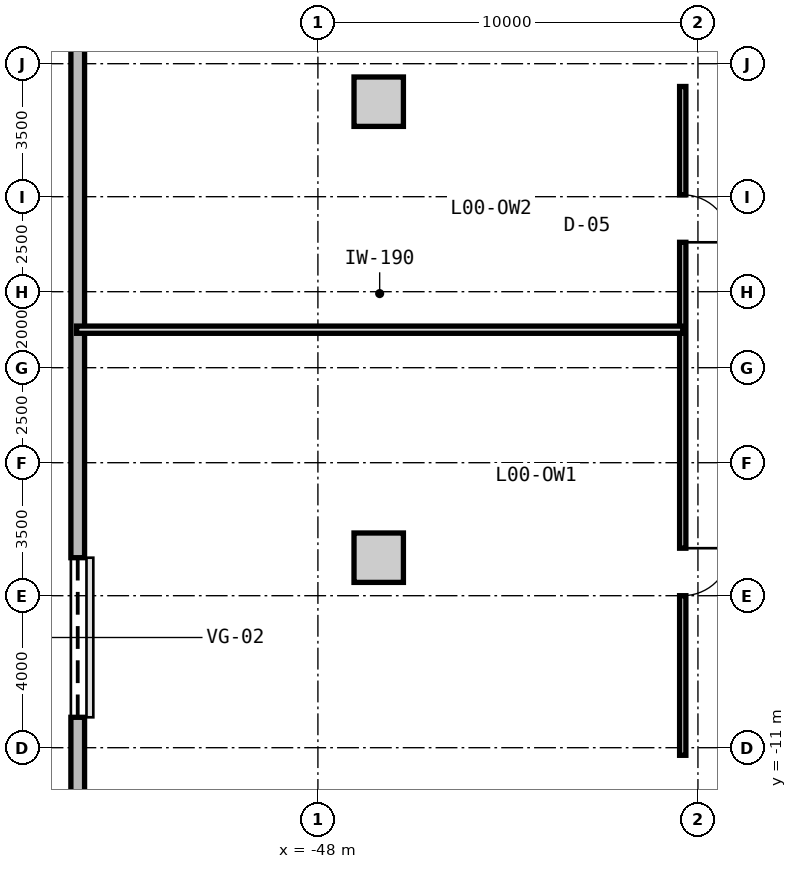
"""IFC4 building model, lengths in metres.
Left out: names, types, materials, properties, quantities, classifications, styles, units other than length and angle.
Written with IfcOpenShell. Run it as: python <this file> out.ifc"""

import sys

from ifc_helpers import new_model, si_unit, direction, frame, frame_2d, origin, origin_2d, place, context, subcontext, project, spatial, rectangle, extrude, source, transform, mapped, element, fill, save


model = new_model("IFC4")
c1 = context("Model", 3, precision=1e-05, world=origin(), true_north=direction((0.0, 1.0)))
c2 = subcontext(c1, "Body", "Model", "MODEL_VIEW")
j1 = project(units=[si_unit("LENGTHUNIT", "METRE"), si_unit("PLANEANGLEUNIT", "RADIAN")], contexts=[c1])
p1 = place(None, origin())
s1 = spatial("IfcSite", under=j1, at=p1, CompositionType="ELEMENT")
p2 = place(p1, origin())
s2 = spatial("IfcBuilding", under=s1, at=p2, CompositionType="ELEMENT")
p3 = place(p2, origin())
s3 = spatial("IfcBuildingStorey", under=s2, at=p3, CompositionType="ELEMENT", Elevation=0.0)
m1 = source(origin(), c2, "Body", "SweptSolid", [
    extrude(rectangle(XDim=1.3, YDim=1.3, at=origin_2d()), origin(), (0.0, 0.0, 1.0), 4.2),
])
for number, where, z_axis, x_axis in (
    (1, (-46.4, -6.0, 0.0), (0.0, 0.0, 1.0), (1.0, 0.0, 0.0)),
    (2, (-46.4, 6.0, 0.0), (0.0, 0.0, 1.0), (1.0, 0.0, 0.0)),
):
    element("IfcColumn", number, at=place(p3, frame(where, z_axis=z_axis, x_axis=x_axis)), inside=s3, PredefinedType="COLUMN", context=c2, shape_type="MappedRepresentation", body=[
        mapped(m1, transform((0.0, 0.0, 0.0), x_axis=(1.0, 0.0, 0.0), y_axis=(0.0, 1.0, 0.0), z_axis=(0.0, 0.0, 1.0), scale=1.0)),
    ])
m2 = source(origin(), c2, "Body", "SweptSolid", [
    extrude(rectangle(XDim=49.64, YDim=0.36, at=frame_2d((24.82, 0.0))), origin(), (0.0, 0.0, 1.0), 3.88),
])
p4 = place(p3, frame((-54.32, -24.82, 0.0), z_axis=(0.0, 0.0, 1.0), x_axis=(0.0, 1.0, 0.0)))
e3 = element("IfcWall", 3, at=p4, inside=s3, PredefinedType="SOLIDWALL", context=c2, shape_type="MappedRepresentation", body=[
    mapped(m2, transform((0.0, 0.0, 0.0), x_axis=(1.0, 0.0, 0.0), y_axis=(0.0, 1.0, 0.0), z_axis=(0.0, 0.0, 1.0), scale=1.0)),
])
p5 = place(p4, frame((14.62, 0.0, 0.0)))
e4 = element("IfcOpeningElement", 4, at=p5, cuts=e3, PredefinedType="OPENING", context=c2, shape_type="SweptSolid", body=[
    extrude(rectangle(XDim=4.2, YDim=2.7, at=frame_2d((2.1, 1.35))), frame((0.0, 0.19, 0.0), z_axis=(0.0, -1.0, 0.0), x_axis=(1.0, 0.0, 0.0)), (0.0, 0.0, 1.0), 0.38),
])
p6 = place(p4, frame((35.12, 0.0, 0.0)))
e5 = element("IfcOpeningElement", 5, at=p6, cuts=e3, PredefinedType="OPENING", context=c2, shape_type="SweptSolid", body=[
    extrude(rectangle(XDim=4.2, YDim=2.7, at=frame_2d((2.1, 1.35))), frame((0.0, 0.19, 0.0), z_axis=(0.0, -1.0, 0.0), x_axis=(1.0, 0.0, 0.0)), (0.0, 0.0, 1.0), 0.38),
])
m3 = source(origin(), c2, "Body", "SweptSolid", [
    extrude(rectangle(XDim=17.6, YDim=0.165, at=frame_2d((8.8, 0.0))), origin(), (0.0, 0.0, 1.0), 3.865),
])
p7 = place(p3, frame((-38.4, -11.2, 0.0), z_axis=(0.0, 0.0, 1.0), x_axis=(0.0, 1.0, 0.0)))
e6 = element("IfcWall", 6, at=p7, inside=s3, PredefinedType="PARTITIONING", context=c2, shape_type="MappedRepresentation", body=[
    mapped(m3, transform((0.0, 0.0, 0.0), x_axis=(1.0, 0.0, 0.0), y_axis=(0.0, 1.0, 0.0), z_axis=(0.0, 0.0, 1.0), scale=1.0)),
])
p8 = place(p7, frame((4.2, 0.0, 0.0)))
e7 = element("IfcOpeningElement", 7, at=p8, cuts=e6, PredefinedType="OPENING", context=c2, shape_type="SweptSolid", body=[
    extrude(rectangle(XDim=1.25, YDim=2.2, at=frame_2d((0.625, 1.1))), frame((0.0, 0.093, 0.0), z_axis=(0.0, -1.0, 0.0), x_axis=(1.0, 0.0, 0.0)), (0.0, 0.0, 1.0), 0.185),
])
p9 = place(p7, frame((13.5, 0.0, 0.0)))
e8 = element("IfcOpeningElement", 8, at=p9, cuts=e6, PredefinedType="OPENING", context=c2, shape_type="SweptSolid", body=[
    extrude(rectangle(XDim=1.25, YDim=2.2, at=frame_2d((0.625, 1.1))), frame((0.0, 0.093, 0.0), z_axis=(0.0, -1.0, 0.0), x_axis=(1.0, 0.0, 0.0)), (0.0, 0.0, 1.0), 0.185),
])
m4 = source(origin(), c2, "Body", "SweptSolid", [
    extrude(rectangle(XDim=15.95, YDim=0.19, at=frame_2d((7.975, 0.0))), origin(), (0.0, 0.0, 1.0), 3.865),
])
p10 = place(p3, frame((-54.35, 0.0, 0.0), z_axis=(0.0, 0.0, 1.0), x_axis=(1.0, 0.0, 0.0)))
e9 = element("IfcWall", 9, at=p10, inside=s3, PredefinedType="PARTITIONING", context=c2, shape_type="MappedRepresentation", body=[
    mapped(m4, transform((0.0, 0.0, 0.0), x_axis=(1.0, 0.0, 0.0), y_axis=(0.0, 1.0, 0.0), z_axis=(0.0, 0.0, 1.0), scale=1.0)),
])
m5 = source(origin(), c2, "Body", "SweptSolid", [
    extrude(rectangle(XDim=4.2, YDim=2.7, at=frame_2d((2.1, 1.35))), frame((0.0, 0.025, 0.0), z_axis=(0.0, -1.0, 0.0), x_axis=(1.0, 0.0, 0.0)), (0.0, 0.0, 1.0), 0.05),
])
p11 = place(p5, origin())
e10 = element("IfcDoor", 10, at=p11, inside=s3, OperationType="ROLLINGUP", PredefinedType="GATE", context=c2, shape_type="MappedRepresentation", body=[
    mapped(m5, transform((0.0, 0.0, 0.0), x_axis=(1.0, 0.0, 0.0), y_axis=(0.0, 1.0, 0.0), z_axis=(0.0, 0.0, 1.0), scale=1.0)),
])
fill(e4, e10)
m6 = source(origin(), c2, "Body", "SweptSolid", [
    extrude(rectangle(XDim=1.25, YDim=2.2, at=frame_2d((0.625, 1.1))), frame((0.0, 0.025, 0.0), z_axis=(0.0, -1.0, 0.0), x_axis=(1.0, 0.0, 0.0)), (0.0, 0.0, 1.0), 0.05),
])
p12 = place(p8, frame((1.25, 0.0, 0.0), z_axis=(0.0, 0.0, 1.0), x_axis=(-1.0, 0.0, 0.0)))
e11 = element("IfcDoor", 11, at=p12, inside=s3, OperationType="SINGLE_SWING_LEFT", PredefinedType="DOOR", context=c2, shape_type="MappedRepresentation", body=[
    mapped(m6, transform((0.0, 0.0, 0.0), x_axis=(1.0, 0.0, 0.0), y_axis=(0.0, 1.0, 0.0), z_axis=(0.0, 0.0, 1.0), scale=1.0)),
])
fill(e7, e11)
p13 = place(p9, frame((1.25, 0.0, 0.0), z_axis=(0.0, 0.0, 1.0), x_axis=(-1.0, 0.0, 0.0)))
e12 = element("IfcDoor", 12, at=p13, inside=s3, OperationType="SINGLE_SWING_RIGHT", PredefinedType="DOOR", context=c2, shape_type="MappedRepresentation", body=[
    mapped(m6, transform((0.0, 0.0, 0.0), x_axis=(1.0, 0.0, 0.0), y_axis=(0.0, 1.0, 0.0), z_axis=(0.0, 0.0, 1.0), scale=1.0)),
])
fill(e8, e12)
save(model, sys.argv[1])
